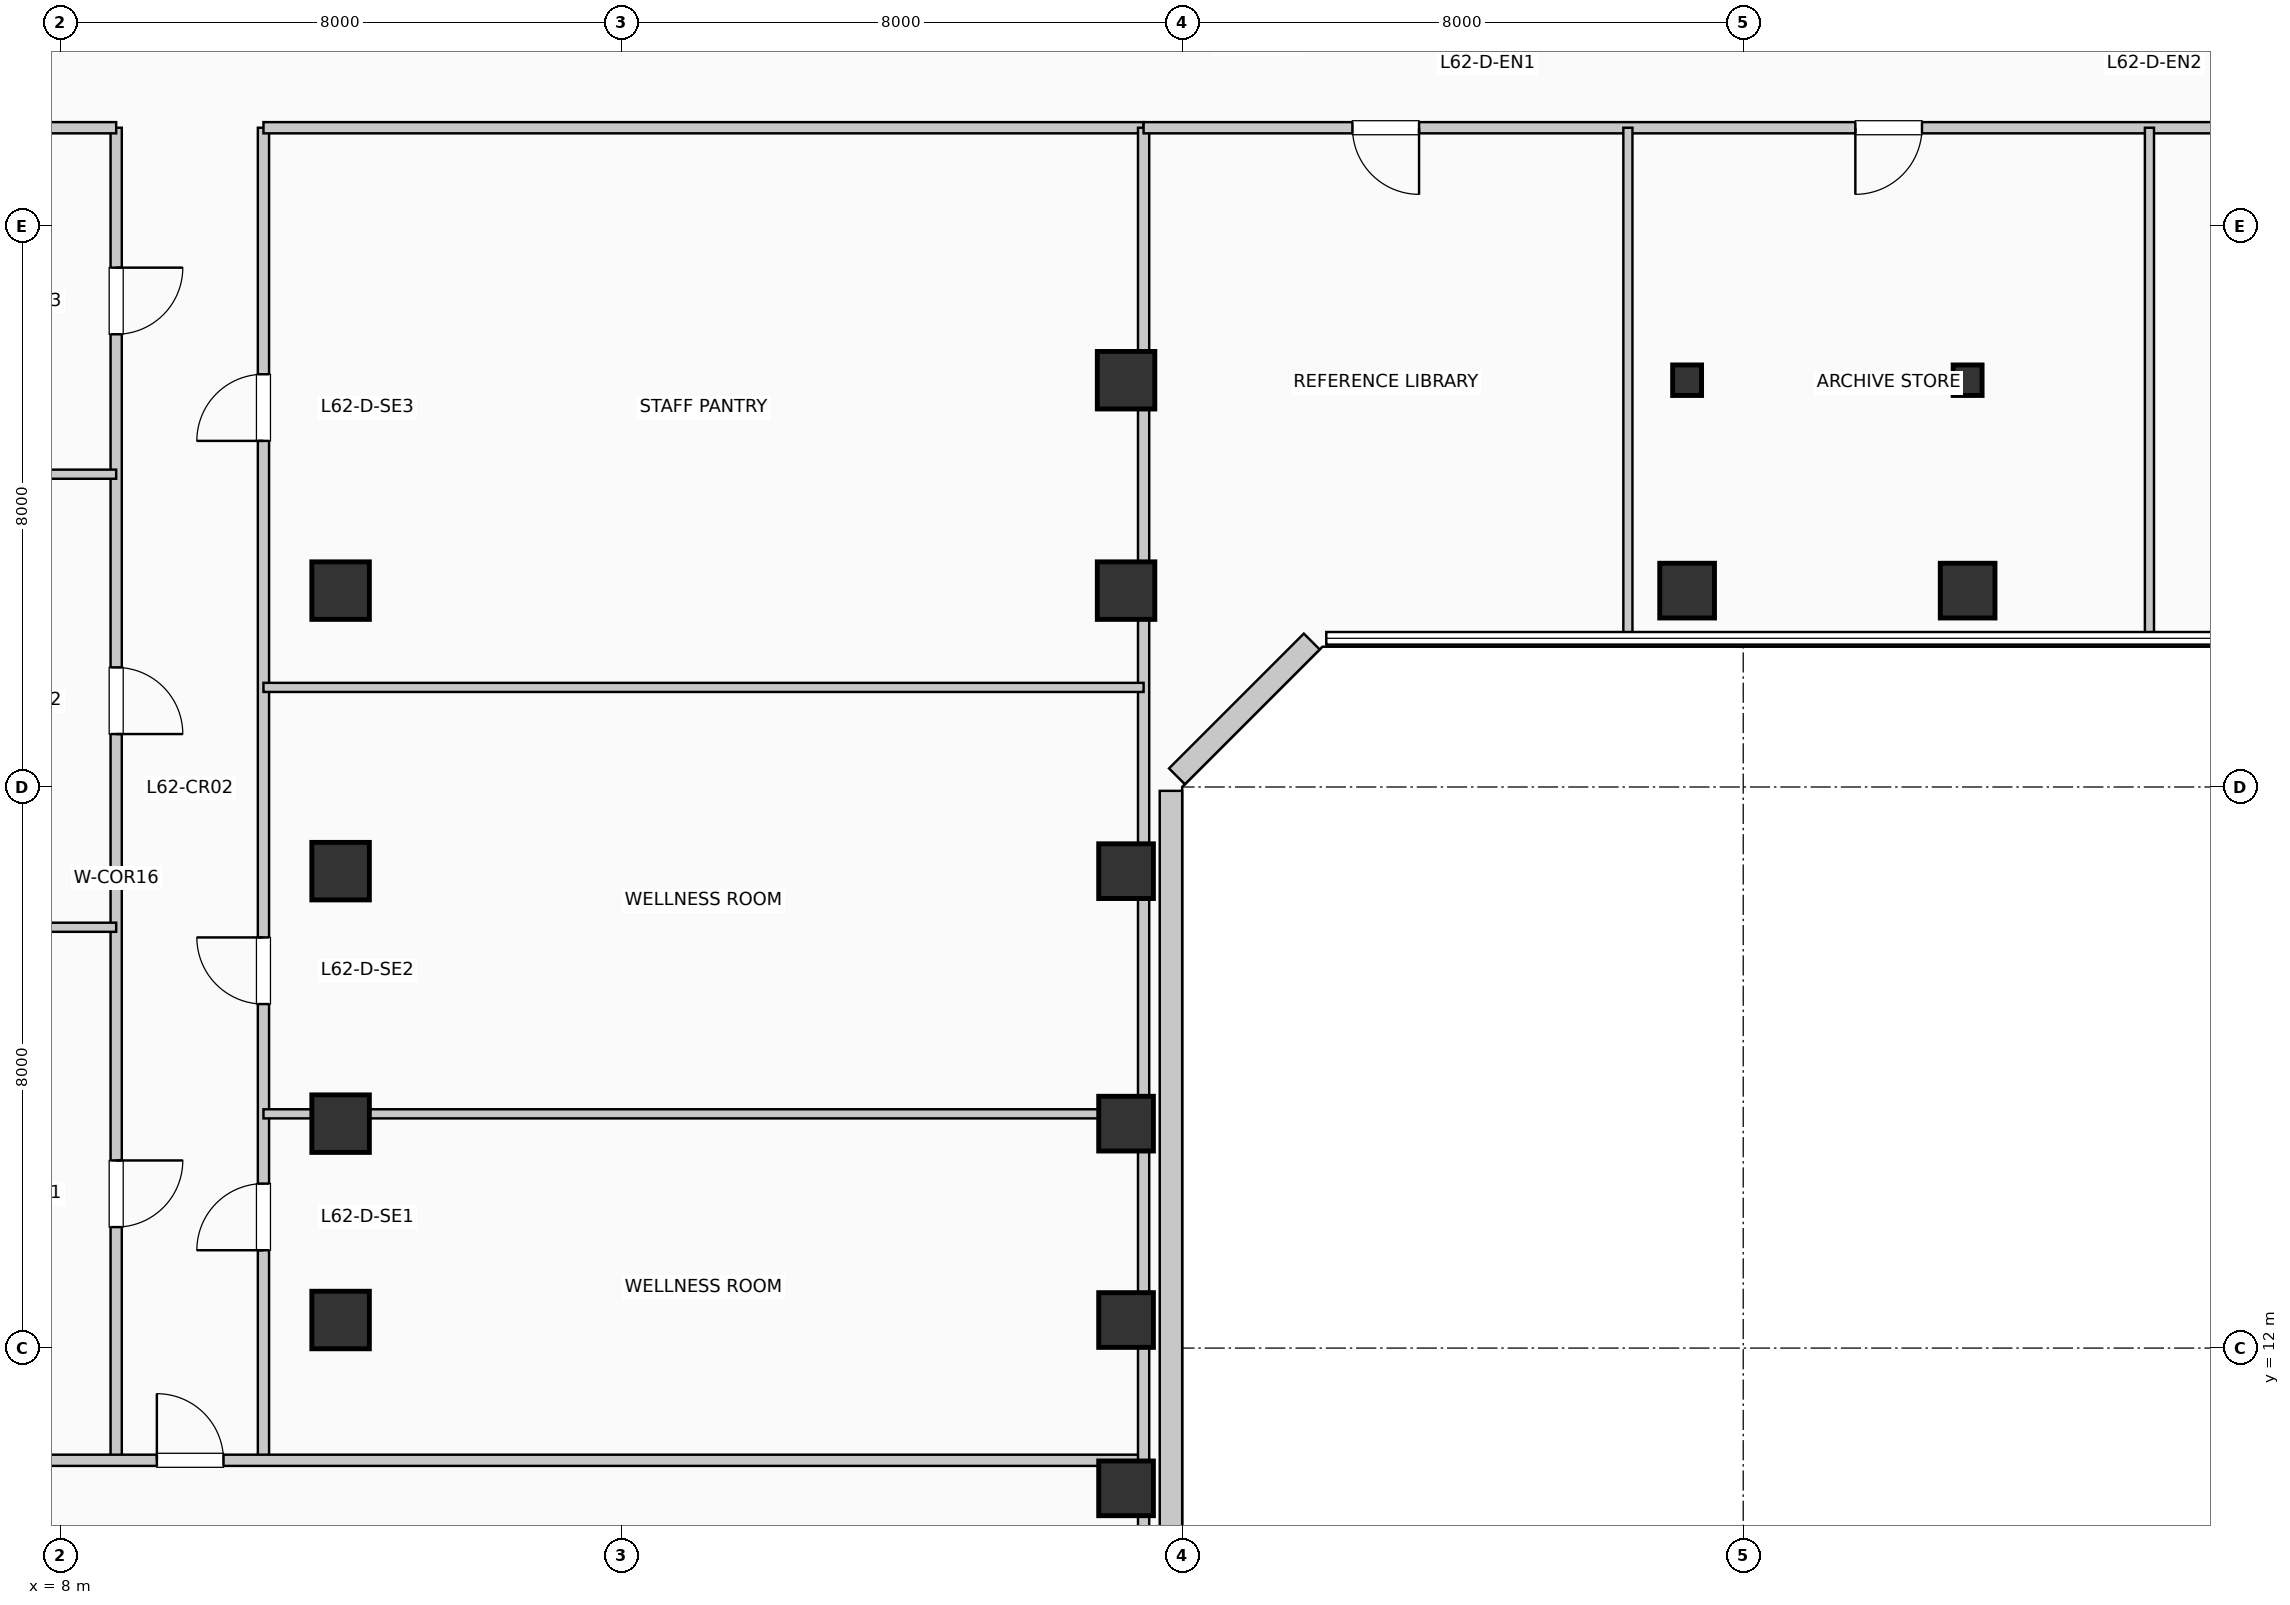
"""IFC4 building model, lengths in metres.
Left out: names, types, materials, properties, quantities, classifications, styles, units other than length and angle.
Written with IfcOpenShell. Run it as: python <this file> out.ifc"""

import sys

from ifc_helpers import new_model, si_unit, direction, frame, frame_2d, origin, origin_2d, place, context, subcontext, project, spatial, rectangle, i_section, extrude, element, fill, save


model = new_model("IFC4")
c1 = context("Model", 3, precision=1e-05, world=origin(), true_north=direction((0.0, 1.0)))
c2 = subcontext(c1, "Body", "Model", "MODEL_VIEW")
j1 = project(units=[si_unit("LENGTHUNIT", "METRE"), si_unit("PLANEANGLEUNIT", "RADIAN")], contexts=[c1])
p1 = place(None, origin())
s1 = spatial("IfcSite", under=j1, at=p1, CompositionType="ELEMENT")
p2 = place(p1, origin())
s2 = spatial("IfcBuilding", under=s1, at=p2, CompositionType="ELEMENT")
p3 = place(p2, frame((0.0, 0.0, 256.41)))
s3 = spatial("IfcBuildingStorey", under=s2, at=p3, CompositionType="ELEMENT", Elevation=256.41)
for number, where, z_axis, x_axis in (
    (1, (12.0, 12.4, 0.0), (0.0, 0.0, 1.0), (1.0, 0.0, 0.0)),
    (2, (12.0, 15.2, 0.0), (0.0, 0.0, 1.0), (1.0, 0.0, 0.0)),
    (3, (12.0, 18.8, 0.0), (0.0, 0.0, 1.0), (1.0, 0.0, 0.0)),
    (4, (12.0, 22.8, 0.0), (0.0, 0.0, 1.0), (1.0, 0.0, 0.0)),
):
    element("IfcColumn", number, at=place(p3, frame(where, z_axis=z_axis, x_axis=x_axis)), inside=s3, PredefinedType="COLUMN", context=c2, shape_type="SweptSolid", body=[
        extrude(rectangle(XDim=0.82, YDim=0.82, at=origin_2d()), origin(), (0.0, 0.0, 1.0), 3.96),
    ])
for number, where, z_axis, x_axis in (
    (5, (23.2, 10.0, 0.0), (0.0, 0.0, 1.0), (1.0, 0.0, 0.0)),
    (6, (23.2, 12.4, 0.0), (0.0, 0.0, 1.0), (1.0, 0.0, 0.0)),
    (7, (23.2, 15.2, 0.0), (0.0, 0.0, 1.0), (1.0, 0.0, 0.0)),
    (8, (23.2, 18.8, 0.0), (0.0, 0.0, 1.0), (1.0, 0.0, 0.0)),
):
    element("IfcColumn", number, at=place(p3, frame(where, z_axis=z_axis, x_axis=x_axis)), inside=s3, PredefinedType="COLUMN", context=c2, shape_type="SweptSolid", body=[
        extrude(rectangle(XDim=0.78, YDim=0.78, at=origin_2d()), origin(), (0.0, 0.0, 1.0), 3.96),
    ])
for number, where, z_axis, x_axis in (
    (9, (23.2, 22.8, 0.0), (0.0, 0.0, 1.0), (1.0, 0.0, 0.0)),
    (10, (23.2, 25.8, 0.0), (0.0, 0.0, 1.0), (1.0, 0.0, 0.0)),
):
    element("IfcColumn", number, at=place(p3, frame(where, z_axis=z_axis, x_axis=x_axis)), inside=s3, PredefinedType="COLUMN", context=c2, shape_type="SweptSolid", body=[
        extrude(rectangle(XDim=0.82, YDim=0.82, at=origin_2d()), origin(), (0.0, 0.0, 1.0), 3.96),
    ])
p4 = place(p3, frame((31.2, 22.8, 0.0), z_axis=(0.0, 0.0, 1.0), x_axis=(1.0, 0.0, 0.0)))
e11 = element("IfcColumn", 11, at=p4, inside=s3, PredefinedType="COLUMN", context=c2, shape_type="SweptSolid", body=[
    extrude(rectangle(XDim=0.78, YDim=0.78, at=origin_2d()), origin(), (0.0, 0.0, 1.0), 3.96),
])
p5 = place(p3, frame((31.2, 25.8, 0.0), z_axis=(0.0, 0.0, 1.0), x_axis=(1.0, 0.0, 0.0)))
e12 = element("IfcColumn", 12, at=p5, inside=s3, PredefinedType="COLUMN", context=c2, shape_type="SweptSolid", body=[
    extrude(i_section(OverallWidth=0.412, OverallDepth=0.435, WebThickness=0.027, FlangeThickness=0.043, at=origin_2d()), origin(), (0.0, 0.0, 1.0), 3.96),
])
p6 = place(p3, frame((35.2, 22.8, 0.0), z_axis=(0.0, 0.0, 1.0), x_axis=(1.0, 0.0, 0.0)))
e13 = element("IfcColumn", 13, at=p6, inside=s3, PredefinedType="COLUMN", context=c2, shape_type="SweptSolid", body=[
    extrude(rectangle(XDim=0.78, YDim=0.78, at=origin_2d()), origin(), (0.0, 0.0, 1.0), 3.96),
])
p7 = place(p3, frame((35.2, 25.8, 0.0), z_axis=(0.0, 0.0, 1.0), x_axis=(1.0, 0.0, 0.0)))
e14 = element("IfcColumn", 14, at=p7, inside=s3, PredefinedType="COLUMN", context=c2, shape_type="SweptSolid", body=[
    extrude(i_section(OverallWidth=0.412, OverallDepth=0.435, WebThickness=0.027, FlangeThickness=0.043, at=origin_2d()), origin(), (0.0, 0.0, 1.0), 3.96),
])
p8 = place(p3, frame((23.84, 8.855, 0.0), z_axis=(0.0, 0.0, 1.0), x_axis=(0.0, 1.0, 0.0)))
e15 = element("IfcWall", 15, at=p8, inside=s3, PredefinedType="SOLIDWALL", context=c2, shape_type="SweptSolid", body=[
    extrude(rectangle(XDim=11.09, YDim=0.32, at=frame_2d((5.545, 0.0))), origin(), (0.0, 0.0, 1.0), 3.71),
])
p9 = place(p3, frame((23.926, 20.152, 0.0), z_axis=(0.0, 0.0, 1.0), x_axis=(0.707106781187, 0.707106781187, 0.0)))
e16 = element("IfcWall", 16, at=p9, inside=s3, PredefinedType="SOLIDWALL", context=c2, shape_type="SweptSolid", body=[
    extrude(rectangle(XDim=2.718, YDim=0.32, at=frame_2d((1.359, 0.0))), origin(), (0.0, 0.0, 1.0), 3.71),
])
p10 = place(p3, frame((8.8, 10.4, 0.0), z_axis=(0.0, 0.0, 1.0), x_axis=(0.0, 1.0, 0.0)))
e17 = element("IfcWall", 17, at=p10, inside=s3, PredefinedType="PARTITIONING", context=c2, shape_type="SweptSolid", body=[
    extrude(rectangle(XDim=19.0, YDim=0.16, at=frame_2d((9.5, 0.0))), origin(), (0.0, 0.0, 1.0), 3.71),
])
p11 = place(p10, frame((4.275, 0.0, 0.0), z_axis=(0.0, 0.0, 1.0), x_axis=(-1.0, 0.0, 0.0)))
e18 = element("IfcOpeningElement", 18, at=p11, cuts=e17, PredefinedType="OPENING", context=c2, shape_type="SweptSolid", body=[
    extrude(rectangle(XDim=0.95, YDim=2.15, at=frame_2d((0.475, 1.075))), frame((0.0, 0.09, 0.0), z_axis=(0.0, -1.0, 0.0), x_axis=(1.0, 0.0, 0.0)), (0.0, 0.0, 1.0), 0.18),
])
p12 = place(p10, frame((11.305, 0.0, 0.0), z_axis=(0.0, 0.0, 1.0), x_axis=(-1.0, 0.0, 0.0)))
e19 = element("IfcOpeningElement", 19, at=p12, cuts=e17, PredefinedType="OPENING", context=c2, shape_type="SweptSolid", body=[
    extrude(rectangle(XDim=0.95, YDim=2.15, at=frame_2d((0.475, 1.075))), frame((0.0, 0.09, 0.0), z_axis=(0.0, -1.0, 0.0), x_axis=(1.0, 0.0, 0.0)), (0.0, 0.0, 1.0), 0.18),
])
p13 = place(p10, frame((17.005, 0.0, 0.0), z_axis=(0.0, 0.0, 1.0), x_axis=(-1.0, 0.0, 0.0)))
e20 = element("IfcOpeningElement", 20, at=p13, cuts=e17, PredefinedType="OPENING", context=c2, shape_type="SweptSolid", body=[
    extrude(rectangle(XDim=0.95, YDim=2.15, at=frame_2d((0.475, 1.075))), frame((0.0, 0.09, 0.0), z_axis=(0.0, -1.0, 0.0), x_axis=(1.0, 0.0, 0.0)), (0.0, 0.0, 1.0), 0.18),
])
p14 = place(p3, frame((10.9, 10.4, 0.0), z_axis=(0.0, 0.0, 1.0), x_axis=(0.0, 1.0, 0.0)))
e21 = element("IfcWall", 21, at=p14, inside=s3, PredefinedType="PARTITIONING", context=c2, shape_type="SweptSolid", body=[
    extrude(rectangle(XDim=19.0, YDim=0.16, at=frame_2d((9.5, 0.0))), origin(), (0.0, 0.0, 1.0), 3.71),
])
p15 = place(p14, frame((2.995, 0.0, 0.0)))
e22 = element("IfcOpeningElement", 22, at=p15, cuts=e21, PredefinedType="OPENING", context=c2, shape_type="SweptSolid", body=[
    extrude(rectangle(XDim=0.95, YDim=2.15, at=frame_2d((0.475, 1.075))), frame((0.0, 0.09, 0.0), z_axis=(0.0, -1.0, 0.0), x_axis=(1.0, 0.0, 0.0)), (0.0, 0.0, 1.0), 0.18),
])
p16 = place(p14, frame((6.505, 0.0, 0.0)))
e23 = element("IfcOpeningElement", 23, at=p16, cuts=e21, PredefinedType="OPENING", context=c2, shape_type="SweptSolid", body=[
    extrude(rectangle(XDim=0.95, YDim=2.15, at=frame_2d((0.475, 1.075))), frame((0.0, 0.09, 0.0), z_axis=(0.0, -1.0, 0.0), x_axis=(1.0, 0.0, 0.0)), (0.0, 0.0, 1.0), 0.18),
])
p17 = place(p14, frame((14.535, 0.0, 0.0)))
e24 = element("IfcOpeningElement", 24, at=p17, cuts=e21, PredefinedType="OPENING", context=c2, shape_type="SweptSolid", body=[
    extrude(rectangle(XDim=0.95, YDim=2.15, at=frame_2d((0.475, 1.075))), frame((0.0, 0.09, 0.0), z_axis=(0.0, -1.0, 0.0), x_axis=(1.0, 0.0, 0.0)), (0.0, 0.0, 1.0), 0.18),
])
p18 = place(p3, frame((0.19, 10.4, 0.0), z_axis=(0.0, 0.0, 1.0), x_axis=(1.0, 0.0, 0.0)))
e25 = element("IfcWall", 25, at=p18, inside=s3, PredefinedType="PARTITIONING", context=c2, shape_type="SweptSolid", body=[
    extrude(rectangle(XDim=23.26, YDim=0.16, at=frame_2d((11.63, 0.0))), origin(), (0.0, 0.0, 1.0), 3.095),
])
p19 = place(p18, frame((9.19, 0.0, 0.0)))
e26 = element("IfcOpeningElement", 26, at=p19, cuts=e25, PredefinedType="OPENING", context=c2, shape_type="SweptSolid", body=[
    extrude(rectangle(XDim=0.95, YDim=2.15, at=frame_2d((0.475, 1.075))), frame((0.0, 0.09, 0.0), z_axis=(0.0, -1.0, 0.0), x_axis=(1.0, 0.0, 0.0)), (0.0, 0.0, 1.0), 0.18),
])
p20 = place(p3, frame((0.19, 29.4, 0.0), z_axis=(0.0, 0.0, 1.0), x_axis=(1.0, 0.0, 0.0)))
e27 = element("IfcWall", 27, at=p20, inside=s3, PredefinedType="PARTITIONING", context=c2, shape_type="SweptSolid", body=[
    extrude(rectangle(XDim=8.61, YDim=0.16, at=frame_2d((4.305, 0.0))), origin(), (0.0, 0.0, 1.0), 3.365),
])
p21 = place(p3, frame((10.9, 29.4, 0.0), z_axis=(0.0, 0.0, 1.0), x_axis=(1.0, 0.0, 0.0)))
e28 = element("IfcWall", 28, at=p21, inside=s3, PredefinedType="PARTITIONING", context=c2, shape_type="SweptSolid", body=[
    extrude(rectangle(XDim=12.55, YDim=0.16, at=frame_2d((6.275, 0.0))), origin(), (0.0, 0.0, 1.0), 3.365),
])
p22 = place(p3, frame((23.45, 5.99, 0.0), z_axis=(0.0, 0.0, 1.0), x_axis=(0.0, 1.0, 0.0)))
e29 = element("IfcWall", 29, at=p22, inside=s3, PredefinedType="PARTITIONING", context=c2, shape_type="SweptSolid", body=[
    extrude(rectangle(XDim=23.41, YDim=0.16, at=frame_2d((11.705, 0.0))), origin(), (0.0, 0.0, 1.0), 3.095),
])
for number, where, z_axis, x_axis in (
    (30, (0.19, 18.0, 0.0), (0.0, 0.0, 1.0), (1.0, 0.0, 0.0)),
    (31, (0.19, 24.46, 0.0), (0.0, 0.0, 1.0), (1.0, 0.0, 0.0)),
):
    element("IfcWall", number, at=place(p3, frame(where, z_axis=z_axis, x_axis=x_axis)), inside=s3, PredefinedType="PARTITIONING", context=c2, shape_type="SweptSolid", body=[
        extrude(rectangle(XDim=8.61, YDim=0.13, at=frame_2d((4.305, 0.0))), origin(), (0.0, 0.0, 1.0), 3.71),
    ])
p23 = place(p3, frame((10.9, 15.34, 0.0), z_axis=(0.0, 0.0, 1.0), x_axis=(1.0, 0.0, 0.0)))
e32 = element("IfcWall", 32, at=p23, inside=s3, PredefinedType="PARTITIONING", context=c2, shape_type="SweptSolid", body=[
    extrude(rectangle(XDim=12.55, YDim=0.13, at=frame_2d((6.275, 0.0))), origin(), (0.0, 0.0, 1.0), 3.095),
])
p24 = place(p3, frame((10.9, 21.42, 0.0), z_axis=(0.0, 0.0, 1.0), x_axis=(1.0, 0.0, 0.0)))
e33 = element("IfcWall", 33, at=p24, inside=s3, PredefinedType="PARTITIONING", context=c2, shape_type="SweptSolid", body=[
    extrude(rectangle(XDim=12.55, YDim=0.13, at=frame_2d((6.275, 0.0))), origin(), (0.0, 0.0, 1.0), 3.71),
])
p25 = place(p3, frame((23.45, 29.4, 0.0), z_axis=(0.0, 0.0, 1.0), x_axis=(1.0, 0.0, 0.0)))
e34 = element("IfcWall", 34, at=p25, inside=s3, PredefinedType="PARTITIONING", context=c2, shape_type="SweptSolid", body=[
    extrude(rectangle(XDim=26.56, YDim=0.16, at=frame_2d((13.28, 0.0))), origin(), (0.0, 0.0, 1.0), 3.365),
])
p26 = place(p25, frame((3.928, 0.0, 0.0), z_axis=(0.0, 0.0, 1.0), x_axis=(-1.0, 0.0, 0.0)))
e35 = element("IfcOpeningElement", 35, at=p26, cuts=e34, PredefinedType="OPENING", context=c2, shape_type="SweptSolid", body=[
    extrude(rectangle(XDim=0.95, YDim=2.15, at=frame_2d((0.475, 1.075))), frame((0.0, 0.09, 0.0), z_axis=(0.0, -1.0, 0.0), x_axis=(1.0, 0.0, 0.0)), (0.0, 0.0, 1.0), 0.18),
])
p27 = place(p25, frame((11.099, 0.0, 0.0), z_axis=(0.0, 0.0, 1.0), x_axis=(-1.0, 0.0, 0.0)))
e36 = element("IfcOpeningElement", 36, at=p27, cuts=e34, PredefinedType="OPENING", context=c2, shape_type="SweptSolid", body=[
    extrude(rectangle(XDim=0.95, YDim=2.15, at=frame_2d((0.475, 1.075))), frame((0.0, 0.09, 0.0), z_axis=(0.0, -1.0, 0.0), x_axis=(1.0, 0.0, 0.0)), (0.0, 0.0, 1.0), 0.18),
])
p28 = place(p25, frame((18.27, 0.0, 0.0), z_axis=(0.0, 0.0, 1.0), x_axis=(-1.0, 0.0, 0.0)))
e37 = element("IfcOpeningElement", 37, at=p28, cuts=e34, PredefinedType="OPENING", context=c2, shape_type="SweptSolid", body=[
    extrude(rectangle(XDim=0.95, YDim=2.15, at=frame_2d((0.475, 1.075))), frame((0.0, 0.09, 0.0), z_axis=(0.0, -1.0, 0.0), x_axis=(1.0, 0.0, 0.0)), (0.0, 0.0, 1.0), 0.18),
])
p29 = place(p25, frame((24.379, 0.0, 0.0), z_axis=(0.0, 0.0, 1.0), x_axis=(-1.0, 0.0, 0.0)))
e38 = element("IfcOpeningElement", 38, at=p29, cuts=e34, PredefinedType="OPENING", context=c2, shape_type="SweptSolid", body=[
    extrude(rectangle(XDim=0.95, YDim=2.15, at=frame_2d((0.475, 1.075))), frame((0.0, 0.09, 0.0), z_axis=(0.0, -1.0, 0.0), x_axis=(1.0, 0.0, 0.0)), (0.0, 0.0, 1.0), 0.18),
])
for number, where, z_axis, x_axis in (
    (39, (30.356, 22.19, 0.0), (0.0, 0.0, 1.0), (0.0, 1.0, 0.0)),
    (40, (37.792, 22.19, 0.0), (0.0, 0.0, 1.0), (0.0, 1.0, 0.0)),
):
    element("IfcWall", number, at=place(p3, frame(where, z_axis=z_axis, x_axis=x_axis)), inside=s3, PredefinedType="PARTITIONING", context=c2, shape_type="SweptSolid", body=[
        extrude(rectangle(XDim=7.21, YDim=0.13, at=frame_2d((3.605, 0.0))), origin(), (0.0, 0.0, 1.0), 3.71),
    ])
p30 = place(p19, origin())
e41 = element("IfcDoor", 41, at=p30, inside=s3, OperationType="SINGLE_SWING_LEFT", PredefinedType="DOOR", context=c2, shape_type="SweptSolid", body=[
    extrude(rectangle(XDim=0.95, YDim=2.15, at=frame_2d((0.475, 1.075))), frame((0.0, 0.025, 0.0), z_axis=(0.0, -1.0, 0.0), x_axis=(1.0, 0.0, 0.0)), (0.0, 0.0, 1.0), 0.05),
])
fill(e26, e41)
p31 = place(p11, origin())
e42 = element("IfcDoor", 42, at=p31, inside=s3, OperationType="SINGLE_SWING_RIGHT", PredefinedType="DOOR", context=c2, shape_type="SweptSolid", body=[
    extrude(rectangle(XDim=0.95, YDim=2.15, at=frame_2d((0.475, 1.075))), frame((0.0, 0.025, 0.0), z_axis=(0.0, -1.0, 0.0), x_axis=(1.0, 0.0, 0.0)), (0.0, 0.0, 1.0), 0.05),
])
fill(e18, e42)
p32 = place(p12, origin())
e43 = element("IfcDoor", 43, at=p32, inside=s3, OperationType="SINGLE_SWING_LEFT", PredefinedType="DOOR", context=c2, shape_type="SweptSolid", body=[
    extrude(rectangle(XDim=0.95, YDim=2.15, at=frame_2d((0.475, 1.075))), frame((0.0, 0.025, 0.0), z_axis=(0.0, -1.0, 0.0), x_axis=(1.0, 0.0, 0.0)), (0.0, 0.0, 1.0), 0.05),
])
fill(e19, e43)
p33 = place(p13, origin())
e44 = element("IfcDoor", 44, at=p33, inside=s3, OperationType="SINGLE_SWING_RIGHT", PredefinedType="DOOR", context=c2, shape_type="SweptSolid", body=[
    extrude(rectangle(XDim=0.95, YDim=2.15, at=frame_2d((0.475, 1.075))), frame((0.0, 0.025, 0.0), z_axis=(0.0, -1.0, 0.0), x_axis=(1.0, 0.0, 0.0)), (0.0, 0.0, 1.0), 0.05),
])
fill(e20, e44)
p34 = place(p15, origin())
e45 = element("IfcDoor", 45, at=p34, inside=s3, OperationType="SINGLE_SWING_LEFT", PredefinedType="DOOR", context=c2, shape_type="SweptSolid", body=[
    extrude(rectangle(XDim=0.95, YDim=2.15, at=frame_2d((0.475, 1.075))), frame((0.0, 0.025, 0.0), z_axis=(0.0, -1.0, 0.0), x_axis=(1.0, 0.0, 0.0)), (0.0, 0.0, 1.0), 0.05),
])
fill(e22, e45)
p35 = place(p16, origin())
e46 = element("IfcDoor", 46, at=p35, inside=s3, OperationType="SINGLE_SWING_RIGHT", PredefinedType="DOOR", context=c2, shape_type="SweptSolid", body=[
    extrude(rectangle(XDim=0.95, YDim=2.15, at=frame_2d((0.475, 1.075))), frame((0.0, 0.025, 0.0), z_axis=(0.0, -1.0, 0.0), x_axis=(1.0, 0.0, 0.0)), (0.0, 0.0, 1.0), 0.05),
])
fill(e23, e46)
p36 = place(p17, origin())
e47 = element("IfcDoor", 47, at=p36, inside=s3, OperationType="SINGLE_SWING_LEFT", PredefinedType="DOOR", context=c2, shape_type="SweptSolid", body=[
    extrude(rectangle(XDim=0.95, YDim=2.15, at=frame_2d((0.475, 1.075))), frame((0.0, 0.025, 0.0), z_axis=(0.0, -1.0, 0.0), x_axis=(1.0, 0.0, 0.0)), (0.0, 0.0, 1.0), 0.05),
])
fill(e24, e47)
p37 = place(p26, origin())
e48 = element("IfcDoor", 48, at=p37, inside=s3, OperationType="SINGLE_SWING_RIGHT", PredefinedType="DOOR", context=c2, shape_type="SweptSolid", body=[
    extrude(rectangle(XDim=0.95, YDim=2.15, at=frame_2d((0.475, 1.075))), frame((0.0, 0.025, 0.0), z_axis=(0.0, -1.0, 0.0), x_axis=(1.0, 0.0, 0.0)), (0.0, 0.0, 1.0), 0.05),
])
fill(e35, e48)
p38 = place(p27, origin())
e49 = element("IfcDoor", 49, at=p38, inside=s3, OperationType="SINGLE_SWING_LEFT", PredefinedType="DOOR", context=c2, shape_type="SweptSolid", body=[
    extrude(rectangle(XDim=0.95, YDim=2.15, at=frame_2d((0.475, 1.075))), frame((0.0, 0.025, 0.0), z_axis=(0.0, -1.0, 0.0), x_axis=(1.0, 0.0, 0.0)), (0.0, 0.0, 1.0), 0.05),
])
fill(e36, e49)
save(model, sys.argv[1])
